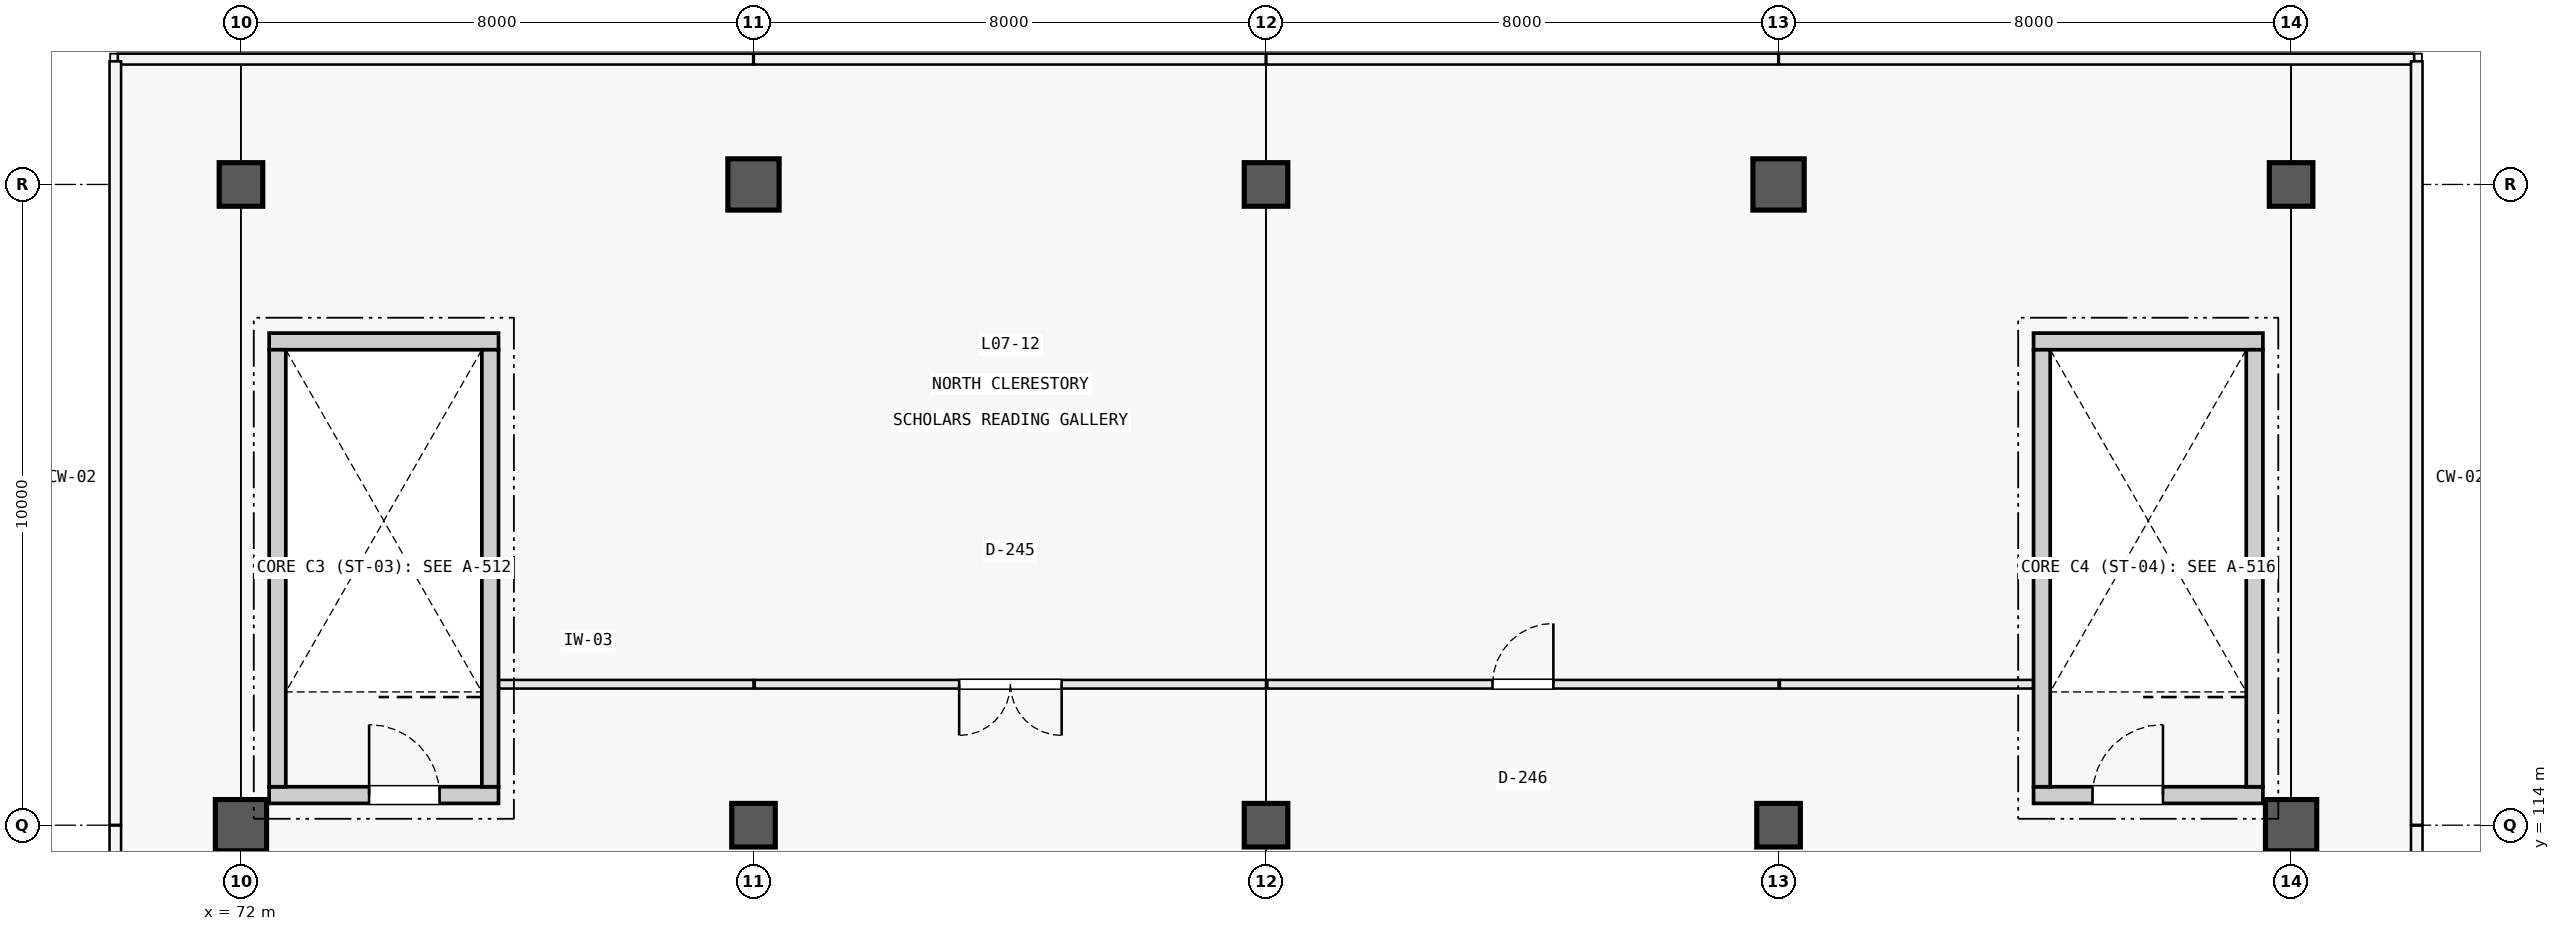
"""IFC4 building model, lengths in metres.
Left out: names, types, materials, properties, quantities, classifications, styles, units other than length and angle.
Written with IfcOpenShell. Run it as: python <this file> out.ifc"""

import sys

from ifc_helpers import new_model, si_unit, direction, frame, frame_2d, origin, origin_2d, place, context, subcontext, project, spatial, rectangle, circle, extrude, element, fill, save


model = new_model("IFC4")
c1 = context("Model", 3, precision=1e-05, world=origin(), true_north=direction((0.0, 1.0)))
c2 = subcontext(c1, "Body", "Model", "MODEL_VIEW")
j1 = project(units=[si_unit("LENGTHUNIT", "METRE"), si_unit("PLANEANGLEUNIT", "RADIAN")], contexts=[c1])
p1 = place(None, origin())
s1 = spatial("IfcSite", under=j1, at=p1, CompositionType="ELEMENT")
p2 = place(p1, origin())
s2 = spatial("IfcBuilding", under=s1, at=p2, CompositionType="ELEMENT")
p3 = place(p2, frame((0.0, 0.0, 30.3)))
s3 = spatial("IfcBuildingStorey", under=s2, at=p3, CompositionType="ELEMENT", Elevation=30.3)
p4 = place(p3, frame((72.0, 114.0, 0.0), z_axis=(0.0, 0.0, 1.0), x_axis=(1.0, 0.0, 0.0)))
e1 = element("IfcColumn", 1, at=p4, inside=s3, PredefinedType="COLUMN", context=c2, shape_type="SweptSolid", body=[
    extrude(rectangle(XDim=0.8, YDim=0.8, at=origin_2d()), origin(), (0.0, 0.0, 1.0), 4.5),
])
for number, where, z_axis, x_axis in (
    (2, (72.0, 124.0, 0.0), (0.0, 0.0, 1.0), (1.0, 0.0, 0.0)),
    (3, (80.0, 114.0, 0.0), (0.0, 0.0, 1.0), (1.0, 0.0, 0.0)),
):
    element("IfcColumn", number, at=place(p3, frame(where, z_axis=z_axis, x_axis=x_axis)), inside=s3, PredefinedType="COLUMN", context=c2, shape_type="SweptSolid", body=[
        extrude(circle(Radius=0.34, at=origin_2d()), origin(), (0.0, 0.0, 1.0), 4.5),
    ])
p5 = place(p3, frame((80.0, 124.0, 0.0), z_axis=(0.0, 0.0, 1.0), x_axis=(1.0, 0.0, 0.0)))
e4 = element("IfcColumn", 4, at=p5, inside=s3, PredefinedType="COLUMN", context=c2, shape_type="SweptSolid", body=[
    extrude(rectangle(XDim=0.8, YDim=0.8, at=origin_2d()), origin(), (0.0, 0.0, 1.0), 4.5),
])
for number, where, z_axis, x_axis in (
    (5, (88.0, 114.0, 0.0), (0.0, 0.0, 1.0), (1.0, 0.0, 0.0)),
    (6, (88.0, 124.0, 0.0), (0.0, 0.0, 1.0), (1.0, 0.0, 0.0)),
    (7, (96.0, 114.0, 0.0), (0.0, 0.0, 1.0), (1.0, 0.0, 0.0)),
):
    element("IfcColumn", number, at=place(p3, frame(where, z_axis=z_axis, x_axis=x_axis)), inside=s3, PredefinedType="COLUMN", context=c2, shape_type="SweptSolid", body=[
        extrude(circle(Radius=0.34, at=origin_2d()), origin(), (0.0, 0.0, 1.0), 4.5),
    ])
for number, where, z_axis, x_axis in (
    (8, (96.0, 124.0, 0.0), (0.0, 0.0, 1.0), (1.0, 0.0, 0.0)),
    (9, (104.0, 114.0, 0.0), (0.0, 0.0, 1.0), (1.0, 0.0, 0.0)),
):
    element("IfcColumn", number, at=place(p3, frame(where, z_axis=z_axis, x_axis=x_axis)), inside=s3, PredefinedType="COLUMN", context=c2, shape_type="SweptSolid", body=[
        extrude(rectangle(XDim=0.8, YDim=0.8, at=origin_2d()), origin(), (0.0, 0.0, 1.0), 4.5),
    ])
p6 = place(p3, frame((104.0, 124.0, 0.0), z_axis=(0.0, 0.0, 1.0), x_axis=(1.0, 0.0, 0.0)))
e10 = element("IfcColumn", 10, at=p6, inside=s3, PredefinedType="COLUMN", context=c2, shape_type="SweptSolid", body=[
    extrude(circle(Radius=0.34, at=origin_2d()), origin(), (0.0, 0.0, 1.0), 4.5),
])
p7 = place(p3, frame((72.44, 114.47, 0.0), z_axis=(0.0, 0.0, 1.0), x_axis=(1.0, 0.0, 0.0)))
e11 = element("IfcWall", 11, at=p7, inside=s3, PredefinedType="SOLIDWALL", context=c2, shape_type="SweptSolid", body=[
    extrude(rectangle(XDim=3.58, YDim=0.26, at=frame_2d((1.79, 0.0))), origin(), (0.0, 0.0, 1.0), 4.5),
])
p8 = place(p7, frame((1.56, 0.0, 0.0)))
e12 = element("IfcOpeningElement", 12, at=p8, cuts=e11, PredefinedType="OPENING", context=c2, shape_type="SweptSolid", body=[
    extrude(rectangle(XDim=1.1, YDim=2.2, at=frame_2d((0.55, 1.1))), frame((0.0, 0.142, 0.0), z_axis=(0.0, -1.0, 0.0), x_axis=(1.0, 0.0, 0.0)), (0.0, 0.0, 1.0), 0.284),
])
p9 = place(p3, frame((72.44, 121.55, 0.0), z_axis=(0.0, 0.0, 1.0), x_axis=(1.0, 0.0, 0.0)))
e13 = element("IfcWall", 13, at=p9, inside=s3, PredefinedType="SOLIDWALL", context=c2, shape_type="SweptSolid", body=[
    extrude(rectangle(XDim=3.58, YDim=0.26, at=frame_2d((1.79, 0.0))), origin(), (0.0, 0.0, 1.0), 4.5),
])
for number, where, z_axis, x_axis in (
    (14, (72.57, 114.6, 0.0), (0.0, 0.0, 1.0), (0.0, 1.0, 0.0)),
    (15, (75.89, 114.6, 0.0), (0.0, 0.0, 1.0), (0.0, 1.0, 0.0)),
):
    element("IfcWall", number, at=place(p3, frame(where, z_axis=z_axis, x_axis=x_axis)), inside=s3, PredefinedType="SOLIDWALL", context=c2, shape_type="SweptSolid", body=[
        extrude(rectangle(XDim=6.82, YDim=0.26, at=frame_2d((3.41, 0.0))), origin(), (0.0, 0.0, 1.0), 4.5),
    ])
p10 = place(p3, frame((99.98, 114.47, 0.0), z_axis=(0.0, 0.0, 1.0), x_axis=(1.0, 0.0, 0.0)))
e16 = element("IfcWall", 16, at=p10, inside=s3, PredefinedType="SOLIDWALL", context=c2, shape_type="SweptSolid", body=[
    extrude(rectangle(XDim=3.58, YDim=0.26, at=frame_2d((1.79, 0.0))), origin(), (0.0, 0.0, 1.0), 4.5),
])
p11 = place(p10, frame((0.92, 0.0, 0.0)))
e17 = element("IfcOpeningElement", 17, at=p11, cuts=e16, PredefinedType="OPENING", context=c2, shape_type="SweptSolid", body=[
    extrude(rectangle(XDim=1.1, YDim=2.2, at=frame_2d((0.55, 1.1))), frame((0.0, 0.142, 0.0), z_axis=(0.0, -1.0, 0.0), x_axis=(1.0, 0.0, 0.0)), (0.0, 0.0, 1.0), 0.284),
])
p12 = place(p3, frame((99.98, 121.55, 0.0), z_axis=(0.0, 0.0, 1.0), x_axis=(1.0, 0.0, 0.0)))
e18 = element("IfcWall", 18, at=p12, inside=s3, PredefinedType="SOLIDWALL", context=c2, shape_type="SweptSolid", body=[
    extrude(rectangle(XDim=3.58, YDim=0.26, at=frame_2d((1.79, 0.0))), origin(), (0.0, 0.0, 1.0), 4.5),
])
for number, where, z_axis, x_axis in (
    (19, (100.11, 114.6, 0.0), (0.0, 0.0, 1.0), (0.0, 1.0, 0.0)),
    (20, (103.43, 114.6, 0.0), (0.0, 0.0, 1.0), (0.0, 1.0, 0.0)),
):
    element("IfcWall", number, at=place(p3, frame(where, z_axis=z_axis, x_axis=x_axis)), inside=s3, PredefinedType="SOLIDWALL", context=c2, shape_type="SweptSolid", body=[
        extrude(rectangle(XDim=6.82, YDim=0.26, at=frame_2d((3.41, 0.0))), origin(), (0.0, 0.0, 1.0), 4.5),
    ])
p13 = place(p3, frame((76.03, 116.2, 0.0), z_axis=(0.0, 0.0, 1.0), x_axis=(1.0, 0.0, 0.0)))
e21 = element("IfcWall", 21, at=p13, inside=s3, PredefinedType="PARTITIONING", context=c2, shape_type="SweptSolid", body=[
    extrude(rectangle(XDim=3.97, YDim=0.135, at=frame_2d((1.985, 0.0))), origin(), (0.0, 0.0, 1.0), 3.11),
])
p14 = place(p3, frame((80.02, 116.2, 0.0), z_axis=(0.0, 0.0, 1.0), x_axis=(1.0, 0.0, 0.0)))
e22 = element("IfcWall", 22, at=p14, inside=s3, PredefinedType="PARTITIONING", context=c2, shape_type="SweptSolid", body=[
    extrude(rectangle(XDim=7.98, YDim=0.135, at=frame_2d((3.99, 0.0))), origin(), (0.0, 0.0, 1.0), 3.11),
])
p15 = place(p14, frame((3.19, 0.0, 0.0)))
e23 = element("IfcOpeningElement", 23, at=p15, cuts=e22, PredefinedType="OPENING", context=c2, shape_type="SweptSolid", body=[
    extrude(rectangle(XDim=1.6, YDim=2.2, at=frame_2d((0.8, 1.1))), frame((0.0, 0.08, 0.0), z_axis=(0.0, -1.0, 0.0), x_axis=(1.0, 0.0, 0.0)), (0.0, 0.0, 1.0), 0.159),
])
p16 = place(p3, frame((88.02, 116.2, 0.0), z_axis=(0.0, 0.0, 1.0), x_axis=(1.0, 0.0, 0.0)))
e24 = element("IfcWall", 24, at=p16, inside=s3, PredefinedType="PARTITIONING", context=c2, shape_type="SweptSolid", body=[
    extrude(rectangle(XDim=7.98, YDim=0.135, at=frame_2d((3.99, 0.0))), origin(), (0.0, 0.0, 1.0), 3.11),
])
p17 = place(p16, frame((3.515, 0.0, 0.0)))
e25 = element("IfcOpeningElement", 25, at=p17, cuts=e24, PredefinedType="OPENING", context=c2, shape_type="SweptSolid", body=[
    extrude(rectangle(XDim=0.95, YDim=2.15, at=frame_2d((0.475, 1.075))), frame((0.0, 0.08, 0.0), z_axis=(0.0, -1.0, 0.0), x_axis=(1.0, 0.0, 0.0)), (0.0, 0.0, 1.0), 0.159),
])
p18 = place(p3, frame((96.02, 116.2, 0.0), z_axis=(0.0, 0.0, 1.0), x_axis=(1.0, 0.0, 0.0)))
e26 = element("IfcWall", 26, at=p18, inside=s3, PredefinedType="PARTITIONING", context=c2, shape_type="SweptSolid", body=[
    extrude(rectangle(XDim=3.95, YDim=0.135, at=frame_2d((1.975, 0.0))), origin(), (0.0, 0.0, 1.0), 3.11),
])
p19 = place(p8, origin())
e27 = element("IfcDoor", 27, at=p19, inside=s3, OperationType="SINGLE_SWING_LEFT", PredefinedType="DOOR", context=c2, shape_type="SweptSolid", body=[
    extrude(rectangle(XDim=1.1, YDim=2.2, at=frame_2d((0.55, 1.1))), frame((0.0, 0.025, 0.0), z_axis=(0.0, -1.0, 0.0), x_axis=(1.0, 0.0, 0.0)), (0.0, 0.0, 1.0), 0.05),
])
fill(e12, e27)
p20 = place(p11, origin())
e28 = element("IfcDoor", 28, at=p20, inside=s3, OperationType="SINGLE_SWING_RIGHT", PredefinedType="DOOR", context=c2, shape_type="SweptSolid", body=[
    extrude(rectangle(XDim=1.1, YDim=2.2, at=frame_2d((0.55, 1.1))), frame((0.0, 0.025, 0.0), z_axis=(0.0, -1.0, 0.0), x_axis=(1.0, 0.0, 0.0)), (0.0, 0.0, 1.0), 0.05),
])
fill(e17, e28)
p21 = place(p15, frame((1.6, 0.0, 0.0), z_axis=(0.0, 0.0, 1.0), x_axis=(-1.0, 0.0, 0.0)))
e29 = element("IfcDoor", 29, at=p21, inside=s3, OperationType="DOUBLE_DOOR_SINGLE_SWING", PredefinedType="DOOR", context=c2, shape_type="SweptSolid", body=[
    extrude(rectangle(XDim=1.6, YDim=2.2, at=frame_2d((0.8, 1.1))), frame((0.0, 0.025, 0.0), z_axis=(0.0, -1.0, 0.0), x_axis=(1.0, 0.0, 0.0)), (0.0, 0.0, 1.0), 0.05),
])
fill(e23, e29)
p22 = place(p17, origin())
e30 = element("IfcDoor", 30, at=p22, inside=s3, OperationType="SINGLE_SWING_RIGHT", PredefinedType="DOOR", context=c2, shape_type="SweptSolid", body=[
    extrude(rectangle(XDim=0.95, YDim=2.15, at=frame_2d((0.475, 1.075))), frame((0.0, 0.025, 0.0), z_axis=(0.0, -1.0, 0.0), x_axis=(1.0, 0.0, 0.0)), (0.0, 0.0, 1.0), 0.05),
])
fill(e25, e30)
save(model, sys.argv[1])
